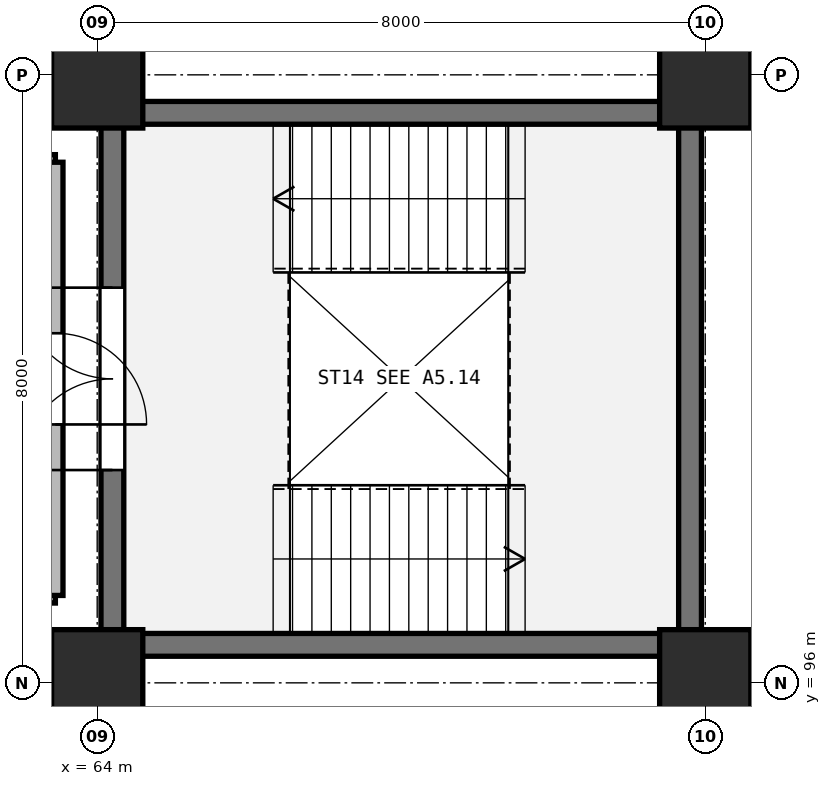
"""IFC4 building model, lengths in metres.
Left out: names, types, materials, properties, quantities, classifications, styles, units other than length and angle.
Written with IfcOpenShell. Run it as: python <this file> out.ifc"""

import sys

from ifc_helpers import new_model, si_unit, direction, frame, frame_2d, origin, origin_2d, place, context, subcontext, project, spatial, rectangle, extrude, element, fill, save


model = new_model("IFC4")
c1 = context("Model", 3, precision=1e-05, world=origin(), true_north=direction((0.0, 1.0)))
c2 = subcontext(c1, "Body", "Model", "MODEL_VIEW")
j1 = project(units=[si_unit("LENGTHUNIT", "METRE"), si_unit("PLANEANGLEUNIT", "RADIAN")], contexts=[c1])
p1 = place(None, origin())
s1 = spatial("IfcSite", under=j1, at=p1, CompositionType="ELEMENT")
p2 = place(p1, origin())
s2 = spatial("IfcBuilding", under=s1, at=p2, CompositionType="ELEMENT")
p3 = place(p2, frame((0.0, 0.0, 5.4)))
s3 = spatial("IfcBuildingStorey", under=s2, at=p3, CompositionType="ELEMENT", Elevation=5.4)
for number, where, z_axis, x_axis in (
    (1, (64.0, 96.0, 0.0), (0.0, 0.0, 1.0), (1.0, 0.0, 0.0)),
    (2, (64.0, 104.0, 0.0), (0.0, 0.0, 1.0), (1.0, 0.0, 0.0)),
    (3, (72.0, 96.0, 0.0), (0.0, 0.0, 1.0), (1.0, 0.0, 0.0)),
    (4, (72.0, 104.0, 0.0), (0.0, 0.0, 1.0), (1.0, 0.0, 0.0)),
):
    element("IfcColumn", number, at=place(p3, frame(where, z_axis=z_axis, x_axis=x_axis)), inside=s3, PredefinedType="COLUMN", context=c2, shape_type="SweptSolid", body=[
        extrude(rectangle(XDim=1.2, YDim=1.4, at=origin_2d()), origin(), (0.0, 0.0, 1.0), 4.8),
    ])
p4 = place(p3, frame((71.8, 96.5, 0.0), z_axis=(0.0, 0.0, 1.0), x_axis=(-1.0, 0.0, 0.0)))
e5 = element("IfcWall", 5, at=p4, inside=s3, PredefinedType="SHEAR", context=c2, shape_type="SweptSolid", body=[
    extrude(rectangle(XDim=7.6, YDim=0.3, at=frame_2d((3.8, 0.0))), origin(), (0.0, 0.0, 1.0), 4.48),
])
p5 = place(p3, frame((64.2, 96.5, 0.0), z_axis=(0.0, 0.0, 1.0), x_axis=(0.0, 1.0, 0.0)))
e6 = element("IfcWall", 6, at=p5, inside=s3, PredefinedType="SHEAR", context=c2, shape_type="SweptSolid", body=[
    extrude(rectangle(XDim=7.0, YDim=0.3, at=frame_2d((3.5, 0.0))), origin(), (0.0, 0.0, 1.0), 4.48),
])
p6 = place(p5, frame((2.3, 0.0, 0.0)))
e7 = element("IfcOpeningElement", 7, at=p6, cuts=e6, PredefinedType="OPENING", context=c2, shape_type="SweptSolid", body=[
    extrude(rectangle(XDim=2.4, YDim=2.2, at=frame_2d((1.2, 1.1))), frame((0.0, 0.16, 0.0), z_axis=(0.0, -1.0, 0.0), x_axis=(1.0, 0.0, 0.0)), (0.0, 0.0, 1.0), 0.32),
])
p7 = place(p3, frame((64.2, 103.5, 0.0), z_axis=(0.0, 0.0, 1.0), x_axis=(1.0, 0.0, 0.0)))
e8 = element("IfcWall", 8, at=p7, inside=s3, PredefinedType="SHEAR", context=c2, shape_type="SweptSolid", body=[
    extrude(rectangle(XDim=7.6, YDim=0.3, at=frame_2d((3.8, 0.0))), origin(), (0.0, 0.0, 1.0), 4.48),
])
p8 = place(p3, frame((71.8, 103.5, 0.0), z_axis=(0.0, 0.0, 1.0), x_axis=(0.0, -1.0, 0.0)))
e9 = element("IfcWall", 9, at=p8, inside=s3, PredefinedType="SHEAR", context=c2, shape_type="SweptSolid", body=[
    extrude(rectangle(XDim=7.0, YDim=0.3, at=frame_2d((3.5, 0.0))), origin(), (0.0, 0.0, 1.0), 4.48),
])
for number, where, z_axis, x_axis in (
    (10, (59.35, 102.85, 0.0), (0.0, 0.0, 1.0), (1.0, 0.0, 0.0)),
    (11, (63.45, 97.15, 0.0), (0.0, 0.0, 1.0), (-1.0, 0.0, 0.0)),
):
    element("IfcWall", number, at=place(p3, frame(where, z_axis=z_axis, x_axis=x_axis)), inside=s3, PredefinedType="PARTITIONING", context=c2, shape_type="SweptSolid", body=[
        extrude(rectangle(XDim=4.1, YDim=0.2, at=frame_2d((2.05, 0.0))), origin(), (0.0, 0.0, 1.0), 4.48),
    ])
p9 = place(p3, frame((63.45, 102.85, 0.0), z_axis=(0.0, 0.0, 1.0), x_axis=(0.0, -1.0, 0.0)))
e12 = element("IfcWall", 12, at=p9, inside=s3, PredefinedType="PARTITIONING", context=c2, shape_type="SweptSolid", body=[
    extrude(rectangle(XDim=5.7, YDim=0.2, at=frame_2d((2.85, 0.0))), origin(), (0.0, 0.0, 1.0), 3.45),
])
p10 = place(p9, frame((2.25, 0.0, 0.0)))
e13 = element("IfcOpeningElement", 13, at=p10, cuts=e12, PredefinedType="OPENING", context=c2, shape_type="SweptSolid", body=[
    extrude(rectangle(XDim=1.2, YDim=2.2, at=frame_2d((0.6, 1.1))), frame((0.0, 0.11, 0.0), z_axis=(0.0, -1.0, 0.0), x_axis=(1.0, 0.0, 0.0)), (0.0, 0.0, 1.0), 0.22),
])
p11 = place(p6, frame((2.4, 0.0, 0.0), z_axis=(0.0, 0.0, 1.0), x_axis=(-1.0, 0.0, 0.0)))
e14 = element("IfcDoor", 14, at=p11, inside=s3, OperationType="DOUBLE_DOOR_SINGLE_SWING", PredefinedType="DOOR", context=c2, shape_type="SweptSolid", body=[
    extrude(rectangle(XDim=2.4, YDim=2.2, at=frame_2d((1.2, 1.1))), frame((0.0, 0.025, 0.0), z_axis=(0.0, -1.0, 0.0), x_axis=(1.0, 0.0, 0.0)), (0.0, 0.0, 1.0), 0.05),
])
fill(e7, e14)
p12 = place(p10, origin())
e15 = element("IfcDoor", 15, at=p12, inside=s3, OperationType="SINGLE_SWING_RIGHT", PredefinedType="DOOR", context=c2, shape_type="SweptSolid", body=[
    extrude(rectangle(XDim=1.2, YDim=2.2, at=frame_2d((0.6, 1.1))), frame((0.0, 0.025, 0.0), z_axis=(0.0, -1.0, 0.0), x_axis=(1.0, 0.0, 0.0)), (0.0, 0.0, 1.0), 0.05),
])
fill(e13, e15)
save(model, sys.argv[1])
